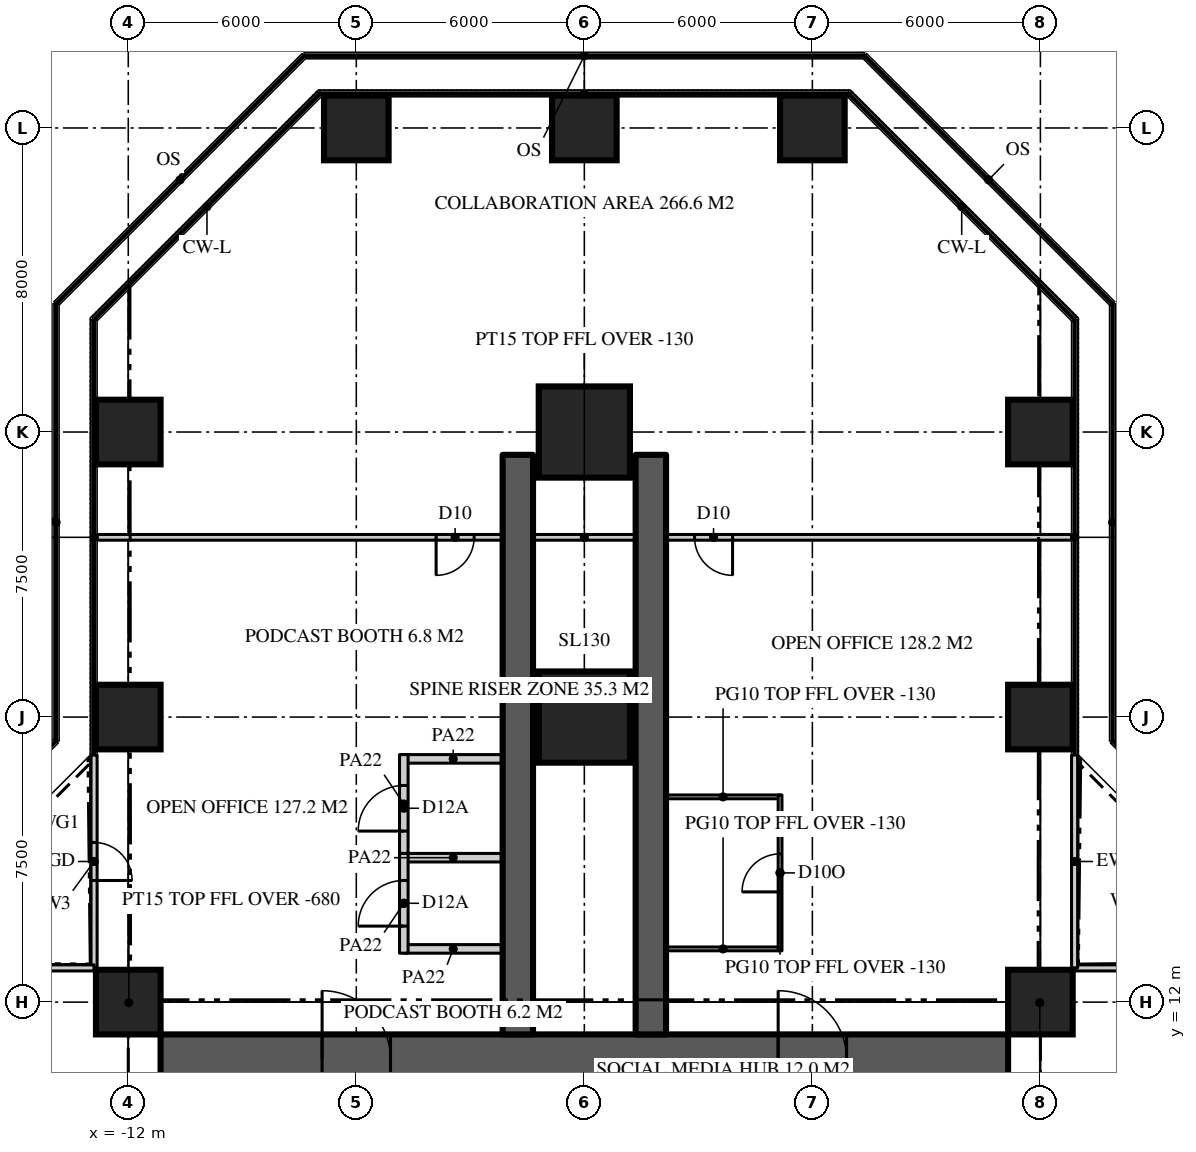
"""IFC4 building model, lengths in metres.
Left out: names, types, materials, properties, quantities, classifications, styles, units other than length and angle.
Written with IfcOpenShell. Run it as: python <this file> out.ifc"""

import sys

from ifc_helpers import new_model, si_unit, direction, frame, frame_2d, origin, origin_2d, place, context, subcontext, project, spatial, rectangle, extrude, element, fill, save


model = new_model("IFC4")
c1 = context("Model", 3, precision=1e-05, world=origin(), true_north=direction((0.0, 1.0)))
c2 = subcontext(c1, "Body", "Model", "MODEL_VIEW")
j1 = project(units=[si_unit("LENGTHUNIT", "METRE"), si_unit("PLANEANGLEUNIT", "RADIAN")], contexts=[c1])
p1 = place(None, origin())
s1 = spatial("IfcSite", under=j1, at=p1, CompositionType="ELEMENT")
p2 = place(p1, origin())
s2 = spatial("IfcBuilding", under=s1, at=p2, CompositionType="ELEMENT")
p3 = place(p2, frame((0.0, 0.0, 70.8)))
s3 = spatial("IfcBuildingStorey", under=s2, at=p3, CompositionType="ELEMENT", Elevation=70.8)
p4 = place(p3, frame((-11.15, 10.5, 0.0), z_axis=(0.0, 0.0, 1.0), x_axis=(1.0, 0.0, 0.0)))
e1 = element("IfcWall", 1, at=p4, inside=s3, PredefinedType="SHEAR", context=c2, shape_type="SweptSolid", body=[
    extrude(rectangle(XDim=22.3, YDim=1.3, at=frame_2d((11.15, 0.0))), origin(), (0.0, 0.0, 1.0), 3.9),
])
p5 = place(p4, frame((4.25, 0.0, 0.0)))
e2 = element("IfcOpeningElement", 2, at=p5, cuts=e1, PredefinedType="OPENING", context=c2, shape_type="SweptSolid", body=[
    extrude(rectangle(XDim=1.8, YDim=2.2, at=frame_2d((0.9, 1.1))), frame((0.0, 0.66, 0.0), z_axis=(0.0, -1.0, 0.0), x_axis=(1.0, 0.0, 0.0)), (0.0, 0.0, 1.0), 1.32),
])
p6 = place(p4, frame((16.25, 0.0, 0.0)))
e3 = element("IfcOpeningElement", 3, at=p6, cuts=e1, PredefinedType="OPENING", context=c2, shape_type="SweptSolid", body=[
    extrude(rectangle(XDim=1.8, YDim=2.2, at=frame_2d((0.9, 1.1))), frame((0.0, 0.66, 0.0), z_axis=(0.0, -1.0, 0.0), x_axis=(1.0, 0.0, 0.0)), (0.0, 0.0, 1.0), 1.32),
])
for number, where, z_axis, x_axis in (
    (4, (1.75, 11.15, 0.0), (0.0, 0.0, 1.0), (0.0, 1.0, 0.0)),
    (5, (-1.75, 11.15, 0.0), (0.0, 0.0, 1.0), (0.0, 1.0, 0.0)),
):
    element("IfcWall", number, at=place(p3, frame(where, z_axis=z_axis, x_axis=x_axis)), inside=s3, PredefinedType="SHEAR", context=c2, shape_type="SweptSolid", body=[
        extrude(rectangle(XDim=15.25, YDim=0.8, at=frame_2d((7.625, 0.0))), origin(), (0.0, 0.0, 1.0), 3.9),
    ])
for number, where, z_axis, x_axis in (
    (6, (-12.0, 12.0, 0.0), (0.0, 0.0, 1.0), (1.0, 0.0, 0.0)),
    (7, (12.0, 12.0, 0.0), (0.0, 0.0, 1.0), (1.0, 0.0, 0.0)),
    (8, (-12.0, 19.5, 0.0), (0.0, 0.0, 1.0), (1.0, 0.0, 0.0)),
):
    element("IfcColumn", number, at=place(p3, frame(where, z_axis=z_axis, x_axis=x_axis)), inside=s3, PredefinedType="COLUMN", context=c2, shape_type="SweptSolid", body=[
        extrude(rectangle(XDim=1.7, YDim=1.7, at=origin_2d()), origin(), (0.0, 0.0, 1.0), 3.9),
    ])
p7 = place(p3, frame((0.0, 19.5, 0.0), z_axis=(0.0, 0.0, 1.0), x_axis=(1.0, 0.0, 0.0)))
e9 = element("IfcColumn", 9, at=p7, inside=s3, PredefinedType="COLUMN", context=c2, shape_type="SweptSolid", body=[
    extrude(rectangle(XDim=2.4, YDim=2.4, at=origin_2d()), origin(), (0.0, 0.0, 1.0), 3.9),
])
for number, where, z_axis, x_axis in (
    (10, (12.0, 19.5, 0.0), (0.0, 0.0, 1.0), (1.0, 0.0, 0.0)),
    (11, (-12.0, 27.0, 0.0), (0.0, 0.0, 1.0), (1.0, 0.0, 0.0)),
):
    element("IfcColumn", number, at=place(p3, frame(where, z_axis=z_axis, x_axis=x_axis)), inside=s3, PredefinedType="COLUMN", context=c2, shape_type="SweptSolid", body=[
        extrude(rectangle(XDim=1.7, YDim=1.7, at=origin_2d()), origin(), (0.0, 0.0, 1.0), 3.9),
    ])
p8 = place(p3, frame((0.0, 27.0, 0.0), z_axis=(0.0, 0.0, 1.0), x_axis=(1.0, 0.0, 0.0)))
e12 = element("IfcColumn", 12, at=p8, inside=s3, PredefinedType="COLUMN", context=c2, shape_type="SweptSolid", body=[
    extrude(rectangle(XDim=2.4, YDim=2.4, at=origin_2d()), origin(), (0.0, 0.0, 1.0), 3.9),
])
for number, where, z_axis, x_axis in (
    (13, (12.0, 27.0, 0.0), (0.0, 0.0, 1.0), (1.0, 0.0, 0.0)),
    (14, (-6.0, 35.0, 0.0), (0.0, 0.0, 1.0), (1.0, 0.0, 0.0)),
    (15, (0.0, 35.0, 0.0), (0.0, 0.0, 1.0), (1.0, 0.0, 0.0)),
    (16, (6.0, 35.0, 0.0), (0.0, 0.0, 1.0), (1.0, 0.0, 0.0)),
):
    element("IfcColumn", number, at=place(p3, frame(where, z_axis=z_axis, x_axis=x_axis)), inside=s3, PredefinedType="COLUMN", context=c2, shape_type="SweptSolid", body=[
        extrude(rectangle(XDim=1.7, YDim=1.7, at=origin_2d()), origin(), (0.0, 0.0, 1.0), 3.9),
    ])
p9 = place(p3, frame((18.5, 12.9, 0.0), z_axis=(0.0, 0.0, 1.0), x_axis=(-1.0, 0.0, 0.0)))
e17 = element("IfcWall", 17, at=p9, inside=s3, PredefinedType="SOLIDWALL", context=c2, shape_type="SweptSolid", body=[
    extrude(rectangle(XDim=5.6, YDim=0.16, at=frame_2d((2.8, 0.0))), origin(), (0.0, 0.0, 1.0), 3.77),
])
p10 = place(p9, frame((2.3, 0.0, 0.0)))
e18 = element("IfcOpeningElement", 18, at=p10, cuts=e17, PredefinedType="OPENING", context=c2, shape_type="SweptSolid", body=[
    extrude(rectangle(XDim=1.0, YDim=2.2, at=frame_2d((0.5, 1.1))), frame((0.0, 0.09, 0.0), z_axis=(0.0, -1.0, 0.0), x_axis=(1.0, 0.0, 0.0)), (0.0, 0.0, 1.0), 0.18),
])
p11 = place(p3, frame((12.9, 12.9, 0.0), z_axis=(0.0, 0.0, 1.0), x_axis=(0.0, 1.0, 0.0)))
e19 = element("IfcWall", 19, at=p11, inside=s3, PredefinedType="SOLIDWALL", context=c2, shape_type="SweptSolid", body=[
    extrude(rectangle(XDim=5.6, YDim=0.16, at=frame_2d((2.8, 0.0))), origin(), (0.0, 0.0, 1.0), 3.77),
])
p12 = place(p3, frame((-12.9, 18.5, 0.0), z_axis=(0.0, 0.0, 1.0), x_axis=(0.0, -1.0, 0.0)))
e20 = element("IfcWall", 20, at=p12, inside=s3, PredefinedType="SOLIDWALL", context=c2, shape_type="SweptSolid", body=[
    extrude(rectangle(XDim=5.6, YDim=0.16, at=frame_2d((2.8, 0.0))), origin(), (0.0, 0.0, 1.0), 3.77),
])
p13 = place(p12, frame((2.3, 0.0, 0.0)))
e21 = element("IfcOpeningElement", 21, at=p13, cuts=e20, PredefinedType="OPENING", context=c2, shape_type="SweptSolid", body=[
    extrude(rectangle(XDim=1.0, YDim=2.2, at=frame_2d((0.5, 1.1))), frame((0.0, 0.09, 0.0), z_axis=(0.0, -1.0, 0.0), x_axis=(1.0, 0.0, 0.0)), (0.0, 0.0, 1.0), 0.18),
])
p14 = place(p3, frame((-12.9, 12.9, 0.0), z_axis=(0.0, 0.0, 1.0), x_axis=(-1.0, 0.0, 0.0)))
e22 = element("IfcWall", 22, at=p14, inside=s3, PredefinedType="SOLIDWALL", context=c2, shape_type="SweptSolid", body=[
    extrude(rectangle(XDim=5.6, YDim=0.16, at=frame_2d((2.8, 0.0))), origin(), (0.0, 0.0, 1.0), 3.77),
])
p15 = place(p3, frame((12.82, 24.229, 0.0), z_axis=(0.0, 0.0, 1.0), x_axis=(-1.0, 0.0, 0.0)))
e23 = element("IfcWall", 23, at=p15, inside=s3, PredefinedType="PARTITIONING", context=c2, shape_type="SweptSolid", body=[
    extrude(rectangle(XDim=25.64, YDim=0.15, at=frame_2d((12.82, 0.0))), origin(), (0.0, 0.0, 1.0), 3.77),
])
p16 = place(p15, frame((15.72, 0.0, 0.0)))
e24 = element("IfcOpeningElement", 24, at=p16, cuts=e23, PredefinedType="OPENING", context=c2, shape_type="SweptSolid", body=[
    extrude(rectangle(XDim=1.0, YDim=2.2, at=frame_2d((0.5, 1.1))), frame((0.0, 0.085, 0.0), z_axis=(0.0, -1.0, 0.0), x_axis=(1.0, 0.0, 0.0)), (0.0, 0.0, 1.0), 0.17),
])
p17 = place(p15, frame((8.92, 0.0, 0.0)))
e25 = element("IfcOpeningElement", 25, at=p17, cuts=e23, PredefinedType="OPENING", context=c2, shape_type="SweptSolid", body=[
    extrude(rectangle(XDim=1.0, YDim=2.2, at=frame_2d((0.5, 1.1))), frame((0.0, 0.085, 0.0), z_axis=(0.0, -1.0, 0.0), x_axis=(1.0, 0.0, 0.0)), (0.0, 0.0, 1.0), 0.17),
])
for number, where, z_axis, x_axis in (
    (26, (-2.15, 13.4, 0.0), (0.0, 0.0, 1.0), (-1.0, 0.0, 0.0)),
    (27, (-2.15, 15.8, 0.0), (0.0, 0.0, 1.0), (-1.0, 0.0, 0.0)),
):
    element("IfcWall", number, at=place(p3, frame(where, z_axis=z_axis, x_axis=x_axis)), inside=s3, PredefinedType="PARTITIONING", context=c2, shape_type="SweptSolid", body=[
        extrude(rectangle(XDim=2.6, YDim=0.225, at=frame_2d((1.3, 0.0))), origin(), (0.0, 0.0, 1.0), 3.77),
    ])
p18 = place(p3, frame((-4.75, 13.288, 0.0), z_axis=(0.0, 0.0, 1.0), x_axis=(0.0, 1.0, 0.0)))
e28 = element("IfcWall", 28, at=p18, inside=s3, PredefinedType="PARTITIONING", context=c2, shape_type="SweptSolid", body=[
    extrude(rectangle(XDim=2.625, YDim=0.225, at=frame_2d((1.312, 0.0))), origin(), (0.0, 0.0, 1.0), 3.77),
])
p19 = place(p18, frame((0.712, 0.0, 0.0)))
e29 = element("IfcOpeningElement", 29, at=p19, cuts=e28, PredefinedType="OPENING", context=c2, shape_type="SweptSolid", body=[
    extrude(rectangle(XDim=1.2, YDim=2.2, at=frame_2d((0.6, 1.1))), frame((0.0, 0.123, 0.0), z_axis=(0.0, -1.0, 0.0), x_axis=(1.0, 0.0, 0.0)), (0.0, 0.0, 1.0), 0.245),
])
p20 = place(p3, frame((-2.15, 18.4, 0.0), z_axis=(0.0, 0.0, 1.0), x_axis=(-1.0, 0.0, 0.0)))
e30 = element("IfcWall", 30, at=p20, inside=s3, PredefinedType="PARTITIONING", context=c2, shape_type="SweptSolid", body=[
    extrude(rectangle(XDim=2.6, YDim=0.225, at=frame_2d((1.3, 0.0))), origin(), (0.0, 0.0, 1.0), 3.77),
])
p21 = place(p3, frame((-4.75, 15.913, 0.0), z_axis=(0.0, 0.0, 1.0), x_axis=(0.0, 1.0, 0.0)))
e31 = element("IfcWall", 31, at=p21, inside=s3, PredefinedType="PARTITIONING", context=c2, shape_type="SweptSolid", body=[
    extrude(rectangle(XDim=2.6, YDim=0.225, at=frame_2d((1.3, 0.0))), origin(), (0.0, 0.0, 1.0), 3.77),
])
p22 = place(p21, frame((0.587, 0.0, 0.0)))
e32 = element("IfcOpeningElement", 32, at=p22, cuts=e31, PredefinedType="OPENING", context=c2, shape_type="SweptSolid", body=[
    extrude(rectangle(XDim=1.2, YDim=2.2, at=frame_2d((0.6, 1.1))), frame((0.0, 0.123, 0.0), z_axis=(0.0, -1.0, 0.0), x_axis=(1.0, 0.0, 0.0)), (0.0, 0.0, 1.0), 0.245),
])
for number, where, z_axis, x_axis in (
    (33, (2.15, 13.4, 0.0), (0.0, 0.0, 1.0), (1.0, 0.0, 0.0)),
    (34, (2.15, 17.4, 0.0), (0.0, 0.0, 1.0), (1.0, 0.0, 0.0)),
):
    element("IfcWall", number, at=place(p3, frame(where, z_axis=z_axis, x_axis=x_axis)), inside=s3, PredefinedType="PARTITIONING", context=c2, shape_type="SweptSolid", body=[
        extrude(rectangle(XDim=3.0, YDim=0.1, at=frame_2d((1.5, 0.0))), origin(), (0.0, 0.0, 1.0), 3.77),
    ])
p23 = place(p3, frame((5.15, 13.35, 0.0), z_axis=(0.0, 0.0, 1.0), x_axis=(0.0, 1.0, 0.0)))
e35 = element("IfcWall", 35, at=p23, inside=s3, PredefinedType="PARTITIONING", context=c2, shape_type="SweptSolid", body=[
    extrude(rectangle(XDim=4.1, YDim=0.1, at=frame_2d((2.05, 0.0))), origin(), (0.0, 0.0, 1.0), 3.77),
])
p24 = place(p23, frame((1.55, 0.0, 0.0)))
e36 = element("IfcOpeningElement", 36, at=p24, cuts=e35, PredefinedType="OPENING", context=c2, shape_type="SweptSolid", body=[
    extrude(rectangle(XDim=1.0, YDim=2.2, at=frame_2d((0.5, 1.1))), frame((0.0, 0.06, 0.0), z_axis=(0.0, -1.0, 0.0), x_axis=(1.0, 0.0, 0.0)), (0.0, 0.0, 1.0), 0.12),
])
for number, where, z_axis, x_axis in (
    (37, (11.15, 11.15, 0.0), (0.0, 0.0, 1.0), (0.707, 0.707, 0.0)),
    (38, (-11.15, 11.15, 0.0), (0.0, 0.0, 1.0), (-0.707, 0.707, 0.0)),
):
    element("IfcWall", number, at=place(p3, frame(where, z_axis=z_axis, x_axis=x_axis)), inside=s3, PredefinedType="PARTITIONING", context=c2, shape_type="SweptSolid", body=[
        extrude(rectangle(XDim=2.362, YDim=0.15, at=frame_2d((1.181, 0.0))), origin(), (0.0, 0.0, 1.0), 3.22),
    ])
p25 = place(p13, origin())
e39 = element("IfcDoor", 39, at=p25, inside=s3, OperationType="SINGLE_SWING_RIGHT", PredefinedType="DOOR", context=c2, shape_type="SweptSolid", body=[
    extrude(rectangle(XDim=1.0, YDim=2.2, at=frame_2d((0.5, 1.1))), frame((0.0, 0.025, 0.0), z_axis=(0.0, -1.0, 0.0), x_axis=(1.0, 0.0, 0.0)), (0.0, 0.0, 1.0), 0.05),
])
fill(e21, e39)
p26 = place(p5, origin())
e40 = element("IfcDoor", 40, at=p26, inside=s3, OperationType="DOUBLE_DOOR_DOUBLE_SWING", PredefinedType="DOOR", context=c2, shape_type="SweptSolid", body=[
    extrude(rectangle(XDim=1.8, YDim=2.2, at=frame_2d((0.9, 1.1))), frame((0.0, 0.025, 0.0), z_axis=(0.0, -1.0, 0.0), x_axis=(1.0, 0.0, 0.0)), (0.0, 0.0, 1.0), 0.05),
])
fill(e2, e40)
p27 = place(p6, origin())
e41 = element("IfcDoor", 41, at=p27, inside=s3, OperationType="DOUBLE_DOOR_DOUBLE_SWING", PredefinedType="DOOR", context=c2, shape_type="SweptSolid", body=[
    extrude(rectangle(XDim=1.8, YDim=2.2, at=frame_2d((0.9, 1.1))), frame((0.0, 0.025, 0.0), z_axis=(0.0, -1.0, 0.0), x_axis=(1.0, 0.0, 0.0)), (0.0, 0.0, 1.0), 0.05),
])
fill(e3, e41)
p28 = place(p16, origin())
e42 = element("IfcDoor", 42, at=p28, inside=s3, OperationType="SINGLE_SWING_RIGHT", PredefinedType="DOOR", context=c2, shape_type="SweptSolid", body=[
    extrude(rectangle(XDim=1.0, YDim=2.2, at=frame_2d((0.5, 1.1))), frame((0.0, 0.025, 0.0), z_axis=(0.0, -1.0, 0.0), x_axis=(1.0, 0.0, 0.0)), (0.0, 0.0, 1.0), 0.05),
])
fill(e24, e42)
p29 = place(p17, origin())
e43 = element("IfcDoor", 43, at=p29, inside=s3, OperationType="SINGLE_SWING_LEFT", PredefinedType="DOOR", context=c2, shape_type="SweptSolid", body=[
    extrude(rectangle(XDim=1.0, YDim=2.2, at=frame_2d((0.5, 1.1))), frame((0.0, 0.025, 0.0), z_axis=(0.0, -1.0, 0.0), x_axis=(1.0, 0.0, 0.0)), (0.0, 0.0, 1.0), 0.05),
])
fill(e25, e43)
p30 = place(p19, origin())
e44 = element("IfcDoor", 44, at=p30, inside=s3, OperationType="SINGLE_SWING_LEFT", PredefinedType="DOOR", context=c2, shape_type="SweptSolid", body=[
    extrude(rectangle(XDim=1.2, YDim=2.2, at=frame_2d((0.6, 1.1))), frame((0.0, 0.025, 0.0), z_axis=(0.0, -1.0, 0.0), x_axis=(1.0, 0.0, 0.0)), (0.0, 0.0, 1.0), 0.05),
])
fill(e29, e44)
p31 = place(p22, origin())
e45 = element("IfcDoor", 45, at=p31, inside=s3, OperationType="SINGLE_SWING_LEFT", PredefinedType="DOOR", context=c2, shape_type="SweptSolid", body=[
    extrude(rectangle(XDim=1.2, YDim=2.2, at=frame_2d((0.6, 1.1))), frame((0.0, 0.025, 0.0), z_axis=(0.0, -1.0, 0.0), x_axis=(1.0, 0.0, 0.0)), (0.0, 0.0, 1.0), 0.05),
])
fill(e32, e45)
p32 = place(p24, origin())
e46 = element("IfcDoor", 46, at=p32, inside=s3, OperationType="SINGLE_SWING_LEFT", PredefinedType="DOOR", context=c2, shape_type="SweptSolid", body=[
    extrude(rectangle(XDim=1.0, YDim=2.2, at=frame_2d((0.5, 1.1))), frame((0.0, 0.025, 0.0), z_axis=(0.0, -1.0, 0.0), x_axis=(1.0, 0.0, 0.0)), (0.0, 0.0, 1.0), 0.05),
])
fill(e36, e46)
save(model, sys.argv[1])
